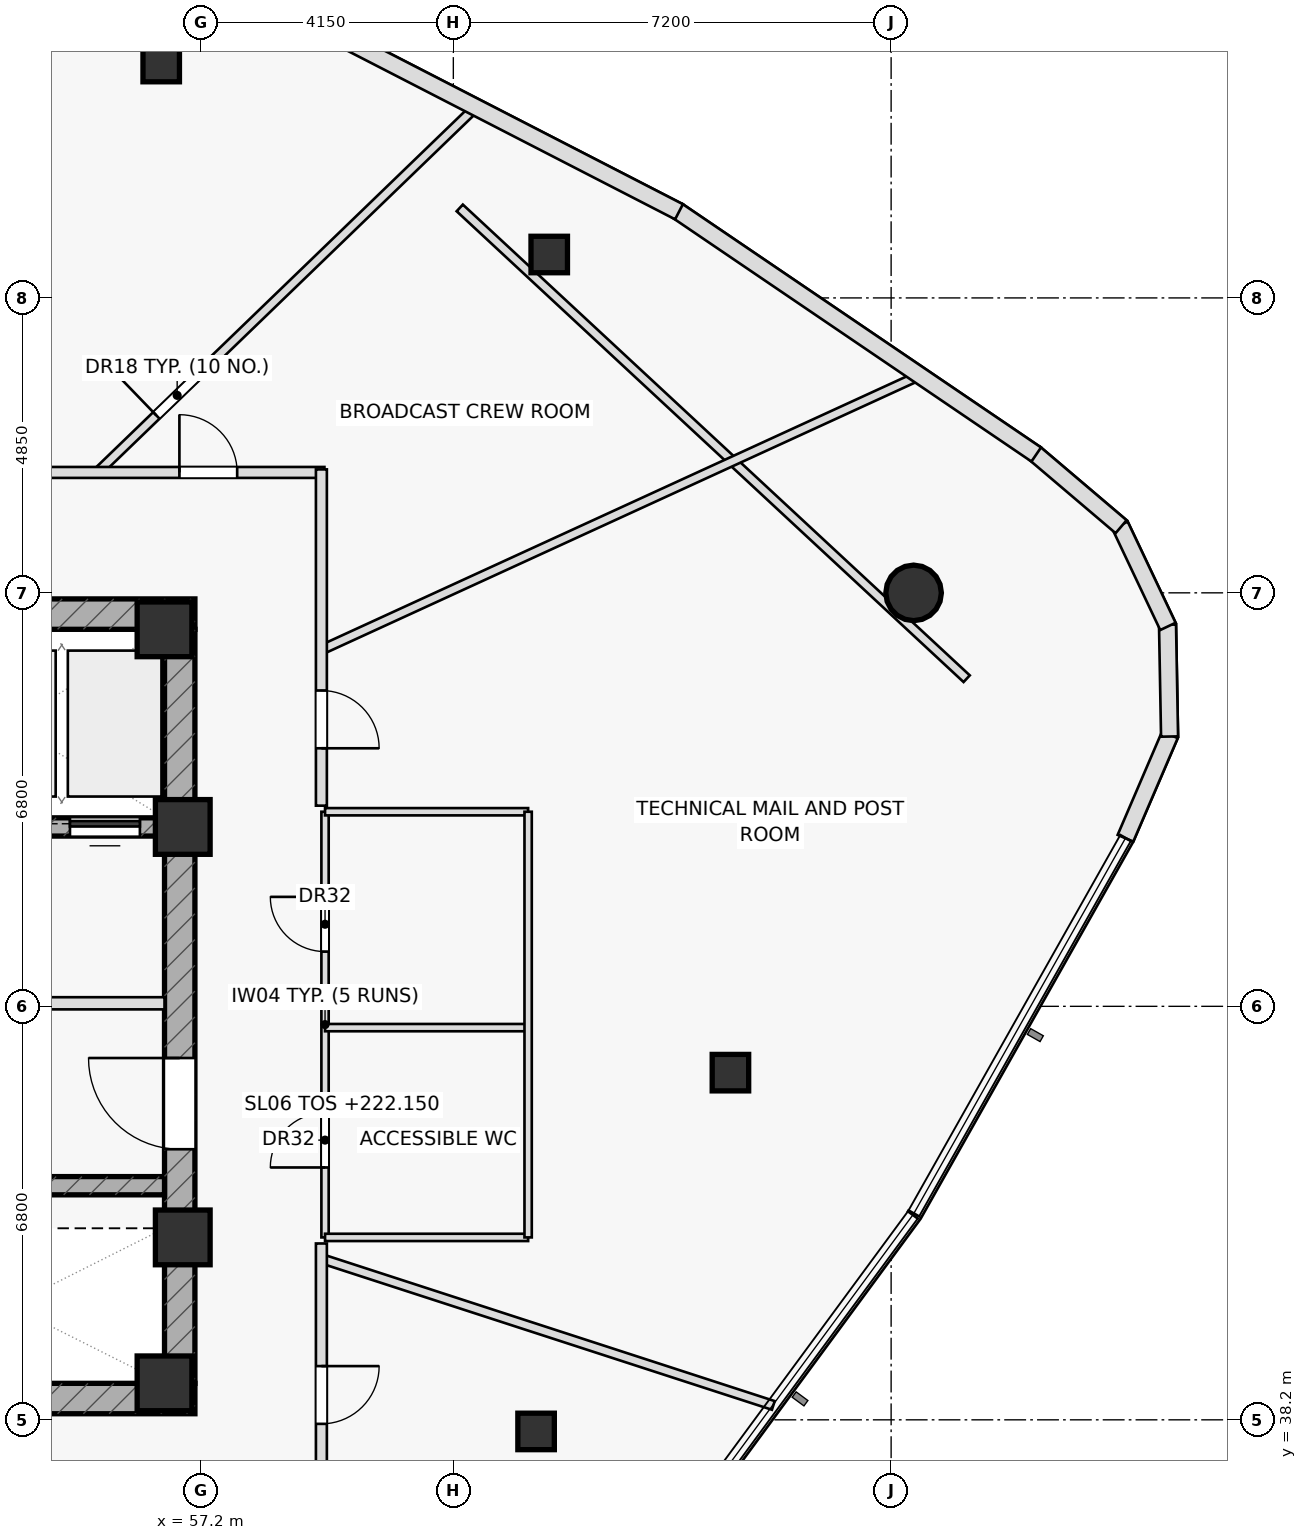
"""IFC4 building model, lengths in metres.
Left out: names, types, materials, properties, quantities, classifications, styles, units other than length and angle.
Written with IfcOpenShell. Run it as: python <this file> out.ifc"""

import sys

from ifc_helpers import new_model, si_unit, direction, frame, frame_2d, origin, origin_2d, place, context, subcontext, project, spatial, rectangle, hollow_rectangle, hollow_circle, extrude, element, fill, save


model = new_model("IFC4")
c1 = context("Model", 3, precision=1e-05, world=origin(), true_north=direction((0.0, 1.0)))
c2 = subcontext(c1, "Body", "Model", "MODEL_VIEW")
j1 = project(units=[si_unit("LENGTHUNIT", "METRE"), si_unit("PLANEANGLEUNIT", "RADIAN")], contexts=[c1])
p1 = place(None, origin())
s1 = spatial("IfcSite", under=j1, at=p1, CompositionType="ELEMENT")
p2 = place(p1, origin())
s2 = spatial("IfcBuilding", under=s1, at=p2, CompositionType="ELEMENT")
p3 = place(p2, frame((0.0, 0.0, 222.15)))
s3 = spatial("IfcBuildingStorey", under=s2, at=p3, CompositionType="ELEMENT", Elevation=222.15)
p4 = place(p3, frame((42.9, 51.45, 0.0), z_axis=(0.0, 0.0, 1.0), x_axis=(1.0, 0.0, 0.0)))
e1 = element("IfcWall", 1, at=p4, inside=s3, PredefinedType="SHEAR", context=c2, shape_type="SweptSolid", body=[
    extrude(rectangle(XDim=14.2, YDim=0.5, at=frame_2d((7.1, 0.0))), origin(), (0.0, 0.0, 1.0), 3.65),
])
p5 = place(p4, frame((0.78, 0.0, 0.0)))
e2 = element("IfcOpeningElement", 2, at=p5, cuts=e1, PredefinedType="OPENING", context=c2, shape_type="SweptSolid", body=[
    extrude(rectangle(XDim=1.05, YDim=2.2, at=frame_2d((0.525, 1.1))), frame((0.0, 0.26, 0.0), z_axis=(0.0, -1.0, 0.0), x_axis=(1.0, 0.0, 0.0)), (0.0, 0.0, 1.0), 0.52),
])
p6 = place(p3, frame((42.9, 38.55, 0.0), z_axis=(0.0, 0.0, 1.0), x_axis=(1.0, 0.0, 0.0)))
e3 = element("IfcWall", 3, at=p6, inside=s3, PredefinedType="SHEAR", context=c2, shape_type="SweptSolid", body=[
    extrude(rectangle(XDim=14.2, YDim=0.5, at=frame_2d((7.1, 0.0))), origin(), (0.0, 0.0, 1.0), 3.65),
])
p7 = place(p6, frame((0.78, 0.0, 0.0)))
e4 = element("IfcOpeningElement", 4, at=p7, cuts=e3, PredefinedType="OPENING", context=c2, shape_type="SweptSolid", body=[
    extrude(rectangle(XDim=1.05, YDim=2.2, at=frame_2d((0.525, 1.1))), frame((0.0, 0.26, 0.0), z_axis=(0.0, -1.0, 0.0), x_axis=(1.0, 0.0, 0.0)), (0.0, 0.0, 1.0), 0.52),
])
p8 = place(p3, frame((56.85, 38.8, 0.0), z_axis=(0.0, 0.0, 1.0), x_axis=(0.0, 1.0, 0.0)))
e5 = element("IfcWall", 5, at=p8, inside=s3, PredefinedType="SHEAR", context=c2, shape_type="SweptSolid", body=[
    extrude(rectangle(XDim=12.4, YDim=0.5, at=frame_2d((6.2, 0.0))), origin(), (0.0, 0.0, 1.0), 3.65),
])
p9 = place(p8, frame((3.85, 0.0, 0.0)))
e6 = element("IfcOpeningElement", 6, at=p9, cuts=e5, PredefinedType="OPENING", context=c2, shape_type="SweptSolid", body=[
    extrude(rectangle(XDim=1.5, YDim=2.2, at=frame_2d((0.75, 1.1))), frame((0.0, 0.26, 0.0), z_axis=(0.0, -1.0, 0.0), x_axis=(1.0, 0.0, 0.0)), (0.0, 0.0, 1.0), 0.52),
])
p10 = place(p3, frame((43.4, 47.95, 0.0), z_axis=(0.0, 0.0, 1.0), x_axis=(1.0, 0.0, 0.0)))
e7 = element("IfcWall", 7, at=p10, inside=s3, PredefinedType="SHEAR", context=c2, shape_type="SweptSolid", body=[
    extrude(rectangle(XDim=13.2, YDim=0.3, at=frame_2d((6.6, 0.0))), origin(), (0.0, 0.0, 1.0), 3.65),
])
p11 = place(p10, frame((8.345, 0.0, 0.0)))
e8 = element("IfcOpeningElement", 8, at=p11, cuts=e7, PredefinedType="OPENING", context=c2, shape_type="SweptSolid", body=[
    extrude(rectangle(XDim=1.15, YDim=2.2, at=frame_2d((0.575, 1.1))), frame((0.0, 0.16, 0.0), z_axis=(0.0, -1.0, 0.0), x_axis=(1.0, 0.0, 0.0)), (0.0, 0.0, 1.0), 0.32),
])
p12 = place(p10, frame((10.065, 0.0, 0.0)))
e9 = element("IfcOpeningElement", 9, at=p12, cuts=e7, PredefinedType="OPENING", context=c2, shape_type="SweptSolid", body=[
    extrude(rectangle(XDim=1.15, YDim=2.2, at=frame_2d((0.575, 1.1))), frame((0.0, 0.16, 0.0), z_axis=(0.0, -1.0, 0.0), x_axis=(1.0, 0.0, 0.0)), (0.0, 0.0, 1.0), 0.32),
])
p13 = place(p10, frame((11.645, 0.0, 0.0)))
e10 = element("IfcOpeningElement", 10, at=p13, cuts=e7, PredefinedType="OPENING", context=c2, shape_type="SweptSolid", body=[
    extrude(rectangle(XDim=1.15, YDim=2.2, at=frame_2d((0.575, 1.1))), frame((0.0, 0.16, 0.0), z_axis=(0.0, -1.0, 0.0), x_axis=(1.0, 0.0, 0.0)), (0.0, 0.0, 1.0), 0.32),
])
p14 = place(p3, frame((43.4, 42.05, 0.0), z_axis=(0.0, 0.0, 1.0), x_axis=(1.0, 0.0, 0.0)))
e11 = element("IfcWall", 11, at=p14, inside=s3, PredefinedType="SHEAR", context=c2, shape_type="SweptSolid", body=[
    extrude(rectangle(XDim=13.2, YDim=0.3, at=frame_2d((6.6, 0.0))), origin(), (0.0, 0.0, 1.0), 3.65),
])
for number, where, z_axis, x_axis in (
    (12, (56.9, 47.95, 0.0), (0.0, 0.0, 1.0), (1.0, 0.0, 0.0)),
    (13, (56.6, 51.2, 0.0), (0.0, 0.0, 1.0), (1.0, 0.0, 0.0)),
    (14, (56.9, 41.2, 0.0), (0.0, 0.0, 1.0), (1.0, 0.0, 0.0)),
    (15, (56.6, 38.8, 0.0), (0.0, 0.0, 1.0), (1.0, 0.0, 0.0)),
):
    element("IfcColumn", number, at=place(p3, frame(where, z_axis=z_axis, x_axis=x_axis)), inside=s3, PredefinedType="COLUMN", context=c2, shape_type="SweptSolid", body=[
        extrude(rectangle(XDim=0.9, YDim=0.9, at=origin_2d()), origin(), (0.0, 0.0, 1.0), 3.65),
    ])
for number, where, z_axis, x_axis in (
    (16, (62.711, 38.009, 0.0), (0.0, 0.0, 1.0), (1.0, 0.0, 0.0)),
    (17, (65.907, 43.909, 0.0), (0.0, 0.0, 1.0), (1.0, 0.0, 0.0)),
):
    element("IfcColumn", number, at=place(p3, frame(where, z_axis=z_axis, x_axis=x_axis)), inside=s3, PredefinedType="COLUMN", context=c2, shape_type="SweptSolid", body=[
        extrude(hollow_rectangle(XDim=0.6, YDim=0.6, WallThickness=0.036, at=origin_2d()), origin(), (0.0, 0.0, 1.0), 3.65),
    ])
p15 = place(p3, frame((68.92, 51.799, 0.0), z_axis=(0.0, 0.0, 1.0), x_axis=(1.0, 0.0, 0.0)))
e18 = element("IfcColumn", 18, at=p15, inside=s3, PredefinedType="COLUMN", context=c2, shape_type="SweptSolid", body=[
    extrude(hollow_circle(Radius=0.457, WallThickness=0.04, at=origin_2d()), origin(), (0.0, 0.0, 1.0), 3.65),
])
for number, where, z_axis, x_axis in (
    (19, (62.927, 57.364, 0.0), (0.0, 0.0, 1.0), (1.0, 0.0, 0.0)),
    (20, (56.546, 60.504, 0.0), (0.0, 0.0, 1.0), (1.0, 0.0, 0.0)),
):
    element("IfcColumn", number, at=place(p3, frame(where, z_axis=z_axis, x_axis=x_axis)), inside=s3, PredefinedType="COLUMN", context=c2, shape_type="SweptSolid", body=[
        extrude(hollow_rectangle(XDim=0.6, YDim=0.6, WallThickness=0.036, at=origin_2d()), origin(), (0.0, 0.0, 1.0), 3.65),
    ])
p16 = place(p3, frame((50.65, 45.05, 0.0), z_axis=(0.0, 0.0, 1.0), x_axis=(1.0, 0.0, 0.0)))
e21 = element("IfcWall", 21, at=p16, inside=s3, PredefinedType="PARTITIONING", context=c2, shape_type="SweptSolid", body=[
    extrude(rectangle(XDim=5.95, YDim=0.2, at=frame_2d((2.975, 0.0))), origin(), (0.0, 0.0, 1.0), 3.65),
])
p17 = place(p16, frame((1.35, 0.0, 0.0)))
e22 = element("IfcOpeningElement", 22, at=p17, cuts=e21, PredefinedType="OPENING", context=c2, shape_type="SweptSolid", body=[
    extrude(rectangle(XDim=1.5, YDim=2.2, at=frame_2d((0.75, 1.1))), frame((0.0, 0.11, 0.0), z_axis=(0.0, -1.0, 0.0), x_axis=(1.0, 0.0, 0.0)), (0.0, 0.0, 1.0), 0.22),
])
p18 = place(p3, frame((69.792, 50.388, 0.0), z_axis=(0.0, 0.0, 1.0), x_axis=(-0.732769799181, 0.680476613418, 0.0)))
e23 = element("IfcWall", 23, at=p18, inside=s3, PredefinedType="PARTITIONING", context=c2, shape_type="SweptSolid", body=[
    extrude(rectangle(XDim=11.378, YDim=0.15, at=frame_2d((5.689, 0.0))), origin(), (0.0, 0.0, 1.0), 3.025),
])
p19 = place(p3, frame((59.24, 41.2, 0.0), z_axis=(0.0, 0.0, 1.0), x_axis=(0.0, 1.0, 0.0)))
e24 = element("IfcWall", 24, at=p19, inside=s3, PredefinedType="PARTITIONING", context=c2, shape_type="SweptSolid", body=[
    extrude(rectangle(XDim=7.0, YDim=0.12, at=frame_2d((3.5, 0.0))), origin(), (0.0, 0.0, 1.0), 3.65),
])
p20 = place(p19, frame((1.15, 0.0, 0.0)))
e25 = element("IfcOpeningElement", 25, at=p20, cuts=e24, PredefinedType="OPENING", context=c2, shape_type="SweptSolid", body=[
    extrude(rectangle(XDim=0.9, YDim=2.05, at=frame_2d((0.45, 1.025))), frame((0.0, 0.07, 0.0), z_axis=(0.0, -1.0, 0.0), x_axis=(1.0, 0.0, 0.0)), (0.0, 0.0, 1.0), 0.14),
])
p21 = place(p19, frame((4.7, 0.0, 0.0)))
e26 = element("IfcOpeningElement", 26, at=p21, cuts=e24, PredefinedType="OPENING", context=c2, shape_type="SweptSolid", body=[
    extrude(rectangle(XDim=0.9, YDim=2.05, at=frame_2d((0.45, 1.025))), frame((0.0, 0.07, 0.0), z_axis=(0.0, -1.0, 0.0), x_axis=(1.0, 0.0, 0.0)), (0.0, 0.0, 1.0), 0.14),
])
p22 = place(p3, frame((59.24, 41.2, 0.0), z_axis=(0.0, 0.0, 1.0), x_axis=(1.0, 0.0, 0.0)))
e27 = element("IfcWall", 27, at=p22, inside=s3, PredefinedType="PARTITIONING", context=c2, shape_type="SweptSolid", body=[
    extrude(rectangle(XDim=3.34, YDim=0.12, at=frame_2d((1.67, 0.0))), origin(), (0.0, 0.0, 1.0), 3.025),
])
for number, where, z_axis, x_axis in (
    (28, (59.24, 44.65, 0.0), (0.0, 0.0, 1.0), (1.0, 0.0, 0.0)),
    (29, (59.24, 48.2, 0.0), (0.0, 0.0, 1.0), (1.0, 0.0, 0.0)),
):
    element("IfcWall", number, at=place(p3, frame(where, z_axis=z_axis, x_axis=x_axis)), inside=s3, PredefinedType="PARTITIONING", context=c2, shape_type="SweptSolid", body=[
        extrude(rectangle(XDim=3.34, YDim=0.12, at=frame_2d((1.67, 0.0))), origin(), (0.0, 0.0, 1.0), 3.65),
    ])
p23 = place(p3, frame((62.58, 41.2, 0.0), z_axis=(0.0, 0.0, 1.0), x_axis=(0.0, 1.0, 0.0)))
e30 = element("IfcWall", 30, at=p23, inside=s3, PredefinedType="PARTITIONING", context=c2, shape_type="SweptSolid", body=[
    extrude(rectangle(XDim=7.0, YDim=0.12, at=frame_2d((3.5, 0.0))), origin(), (0.0, 0.0, 1.0), 3.325),
])
p24 = place(p3, frame((59.18, 40.85, 0.0), z_axis=(0.0, 0.0, 1.0), x_axis=(0.951119439097, -0.308823270775, 0.0)))
e31 = element("IfcWall", 31, at=p24, inside=s3, PredefinedType="PARTITIONING", context=c2, shape_type="SweptSolid", body=[
    extrude(rectangle(XDim=7.815, YDim=0.15, at=frame_2d((3.907, 0.0))), origin(), (0.0, 0.0, 1.0), 3.025),
])
p25 = place(p3, frame((59.18, 50.862, 0.0), z_axis=(0.0, 0.0, 1.0), x_axis=(0.908933957831, 0.416940115966, 0.0)))
e32 = element("IfcWall", 32, at=p25, inside=s3, PredefinedType="PARTITIONING", context=c2, shape_type="SweptSolid", body=[
    extrude(rectangle(XDim=10.839, YDim=0.15, at=frame_2d((5.419, 0.0))), origin(), (0.0, 0.0, 1.0), 3.025),
])
p26 = place(p3, frame((55.495, 53.78, 0.0), z_axis=(0.0, 0.0, 1.0), x_axis=(0.719458295386, 0.694535644298, 0.0)))
e33 = element("IfcWall", 33, at=p26, inside=s3, PredefinedType="PARTITIONING", context=c2, shape_type="SweptSolid", body=[
    extrude(rectangle(XDim=8.66, YDim=0.15, at=frame_2d((4.33, 0.0))), origin(), (0.0, 0.0, 1.0), 3.025),
])
p27 = place(p26, frame((1.35, 0.0, 0.0)))
e34 = element("IfcOpeningElement", 34, at=p27, cuts=e33, PredefinedType="OPENING", context=c2, shape_type="SweptSolid", body=[
    extrude(rectangle(XDim=0.95, YDim=2.05, at=frame_2d((0.475, 1.025))), frame((0.0, 0.085, 0.0), z_axis=(0.0, -1.0, 0.0), x_axis=(1.0, 0.0, 0.0)), (0.0, 0.0, 1.0), 0.17),
])
p28 = place(p3, frame((54.3, 53.78, 0.0), z_axis=(0.0, 0.0, 1.0), x_axis=(1.0, 0.0, 0.0)))
e35 = element("IfcWall", 35, at=p28, inside=s3, PredefinedType="PARTITIONING", context=c2, shape_type="SweptSolid", body=[
    extrude(rectangle(XDim=4.93, YDim=0.18, at=frame_2d((2.465, 0.0))), origin(), (0.0, 0.0, 1.0), 3.65),
])
p29 = place(p28, frame((2.545, 0.0, 0.0)))
e36 = element("IfcOpeningElement", 36, at=p29, cuts=e35, PredefinedType="OPENING", context=c2, shape_type="SweptSolid", body=[
    extrude(rectangle(XDim=0.95, YDim=2.05, at=frame_2d((0.475, 1.025))), frame((0.0, 0.1, 0.0), z_axis=(0.0, -1.0, 0.0), x_axis=(1.0, 0.0, 0.0)), (0.0, 0.0, 1.0), 0.2),
])
p30 = place(p3, frame((59.18, 53.83, 0.0), z_axis=(0.0, 0.0, 1.0), x_axis=(0.0, -1.0, 0.0)))
e37 = element("IfcWall", 37, at=p30, inside=s3, PredefinedType="PARTITIONING", context=c2, shape_type="SweptSolid", body=[
    extrude(rectangle(XDim=5.53, YDim=0.18, at=frame_2d((2.765, 0.0))), origin(), (0.0, 0.0, 1.0), 3.65),
])
p31 = place(p30, frame((3.636, 0.0, 0.0)))
e38 = element("IfcOpeningElement", 38, at=p31, cuts=e37, PredefinedType="OPENING", context=c2, shape_type="SweptSolid", body=[
    extrude(rectangle(XDim=0.95, YDim=2.05, at=frame_2d((0.475, 1.025))), frame((0.0, 0.1, 0.0), z_axis=(0.0, -1.0, 0.0), x_axis=(1.0, 0.0, 0.0)), (0.0, 0.0, 1.0), 0.2),
])
p32 = place(p3, frame((59.18, 41.1, 0.0), z_axis=(0.0, 0.0, 1.0), x_axis=(0.0, -1.0, 0.0)))
e39 = element("IfcWall", 39, at=p32, inside=s3, PredefinedType="PARTITIONING", context=c2, shape_type="SweptSolid", body=[
    extrude(rectangle(XDim=4.93, YDim=0.18, at=frame_2d((2.465, 0.0))), origin(), (0.0, 0.0, 1.0), 3.325),
])
p33 = place(p32, frame((2.017, 0.0, 0.0)))
e40 = element("IfcOpeningElement", 40, at=p33, cuts=e39, PredefinedType="OPENING", context=c2, shape_type="SweptSolid", body=[
    extrude(rectangle(XDim=0.95, YDim=2.05, at=frame_2d((0.475, 1.025))), frame((0.0, 0.1, 0.0), z_axis=(0.0, -1.0, 0.0), x_axis=(1.0, 0.0, 0.0)), (0.0, 0.0, 1.0), 0.2),
])
p34 = place(p3, frame((72.404, 47.764, 0.0), z_axis=(0.0, 0.0, 1.0), x_axis=(0.394778467285, 0.91877633936, 0.0)))
e41 = element("IfcWall", 41, at=p34, inside=s3, PredefinedType="STANDARD", context=c2, shape_type="SweptSolid", body=[
    extrude(rectangle(XDim=1.852, YDim=0.28, at=frame_2d((0.926, 0.0))), origin(), (0.0, 0.0, 1.0), 3.65),
])
for number, where, z_axis, x_axis in (
    (42, (73.129, 49.437, 0.0), (0.0, 0.0, 1.0), (-0.018, 1.0, 0.0)),
    (43, (73.102, 51.248, 0.0), (0.0, 0.0, 1.0), (-0.428, 0.904, 0.0)),
):
    element("IfcWall", number, at=place(p3, frame(where, z_axis=z_axis, x_axis=x_axis)), inside=s3, PredefinedType="STANDARD", context=c2, shape_type="SweptSolid", body=[
        extrude(rectangle(XDim=1.84, YDim=0.28, at=frame_2d((0.92, 0.0))), origin(), (0.0, 0.0, 1.0), 3.65),
    ])
p35 = place(p3, frame((72.333, 52.887, 0.0), z_axis=(0.0, 0.0, 1.0), x_axis=(-0.762117143342, 0.647439155307, 0.0)))
e44 = element("IfcWall", 44, at=p35, inside=s3, PredefinedType="STANDARD", context=c2, shape_type="SweptSolid", body=[
    extrude(rectangle(XDim=1.863, YDim=0.28, at=frame_2d((0.931, 0.0))), origin(), (0.0, 0.0, 1.0), 3.65),
])
p36 = place(p3, frame((70.937, 54.075, 0.0), z_axis=(0.0, 0.0, 1.0), x_axis=(-0.827312732956, 0.561741614881, 0.0)))
e45 = element("IfcWall", 45, at=p36, inside=s3, PredefinedType="STANDARD", context=c2, shape_type="SweptSolid", body=[
    extrude(rectangle(XDim=7.133, YDim=0.28, at=frame_2d((3.566, 0.0))), origin(), (0.0, 0.0, 1.0), 3.65),
])
p37 = place(p3, frame((65.061, 58.067, 0.0), z_axis=(0.0, 0.0, 1.0), x_axis=(-0.889204120168, 0.457510691325, 0.0)))
e46 = element("IfcWall", 46, at=p37, inside=s3, PredefinedType="STANDARD", context=c2, shape_type="SweptSolid", body=[
    extrude(rectangle(XDim=7.121, YDim=0.28, at=frame_2d((3.561, 0.0))), origin(), (0.0, 0.0, 1.0), 3.65),
])
p38 = place(p9, origin())
e47 = element("IfcDoor", 47, at=p38, inside=s3, OperationType="SINGLE_SWING_RIGHT", PredefinedType="DOOR", context=c2, shape_type="SweptSolid", body=[
    extrude(rectangle(XDim=1.5, YDim=2.2, at=frame_2d((0.75, 1.1))), frame((0.0, 0.025, 0.0), z_axis=(0.0, -1.0, 0.0), x_axis=(1.0, 0.0, 0.0)), (0.0, 0.0, 1.0), 0.05),
])
fill(e6, e47)
p39 = place(p20, origin())
e48 = element("IfcDoor", 48, at=p39, inside=s3, OperationType="SINGLE_SWING_LEFT", PredefinedType="DOOR", context=c2, shape_type="SweptSolid", body=[
    extrude(rectangle(XDim=0.9, YDim=2.05, at=frame_2d((0.45, 1.025))), frame((0.0, 0.025, 0.0), z_axis=(0.0, -1.0, 0.0), x_axis=(1.0, 0.0, 0.0)), (0.0, 0.0, 1.0), 0.05),
])
fill(e25, e48)
p40 = place(p21, origin())
e49 = element("IfcDoor", 49, at=p40, inside=s3, OperationType="SINGLE_SWING_RIGHT", PredefinedType="DOOR", context=c2, shape_type="SweptSolid", body=[
    extrude(rectangle(XDim=0.9, YDim=2.05, at=frame_2d((0.45, 1.025))), frame((0.0, 0.025, 0.0), z_axis=(0.0, -1.0, 0.0), x_axis=(1.0, 0.0, 0.0)), (0.0, 0.0, 1.0), 0.05),
])
fill(e26, e49)
p41 = place(p27, origin())
e50 = element("IfcDoor", 50, at=p41, inside=s3, OperationType="SINGLE_SWING_LEFT", PredefinedType="DOOR", context=c2, shape_type="SweptSolid", body=[
    extrude(rectangle(XDim=0.95, YDim=2.05, at=frame_2d((0.475, 1.025))), frame((0.0, 0.025, 0.0), z_axis=(0.0, -1.0, 0.0), x_axis=(1.0, 0.0, 0.0)), (0.0, 0.0, 1.0), 0.05),
])
fill(e34, e50)
p42 = place(p29, origin())
e51 = element("IfcDoor", 51, at=p42, inside=s3, OperationType="SINGLE_SWING_LEFT", PredefinedType="DOOR", context=c2, shape_type="SweptSolid", body=[
    extrude(rectangle(XDim=0.95, YDim=2.05, at=frame_2d((0.475, 1.025))), frame((0.0, 0.025, 0.0), z_axis=(0.0, -1.0, 0.0), x_axis=(1.0, 0.0, 0.0)), (0.0, 0.0, 1.0), 0.05),
])
fill(e36, e51)
p43 = place(p31, origin())
e52 = element("IfcDoor", 52, at=p43, inside=s3, OperationType="SINGLE_SWING_RIGHT", PredefinedType="DOOR", context=c2, shape_type="SweptSolid", body=[
    extrude(rectangle(XDim=0.95, YDim=2.05, at=frame_2d((0.475, 1.025))), frame((0.0, 0.025, 0.0), z_axis=(0.0, -1.0, 0.0), x_axis=(1.0, 0.0, 0.0)), (0.0, 0.0, 1.0), 0.05),
])
fill(e38, e52)
p44 = place(p33, origin())
e53 = element("IfcDoor", 53, at=p44, inside=s3, OperationType="SINGLE_SWING_LEFT", PredefinedType="DOOR", context=c2, shape_type="SweptSolid", body=[
    extrude(rectangle(XDim=0.95, YDim=2.05, at=frame_2d((0.475, 1.025))), frame((0.0, 0.025, 0.0), z_axis=(0.0, -1.0, 0.0), x_axis=(1.0, 0.0, 0.0)), (0.0, 0.0, 1.0), 0.05),
])
fill(e40, e53)
p45 = place(p13, origin())
e54 = element("IfcDoor", 54, at=p45, inside=s3, OperationType="SLIDING_TO_LEFT", PredefinedType="DOOR", context=c2, shape_type="SweptSolid", body=[
    extrude(rectangle(XDim=1.15, YDim=2.2, at=frame_2d((0.575, 1.1))), frame((0.0, 0.025, 0.0), z_axis=(0.0, -1.0, 0.0), x_axis=(1.0, 0.0, 0.0)), (0.0, 0.0, 1.0), 0.05),
])
fill(e10, e54)
save(model, sys.argv[1])
